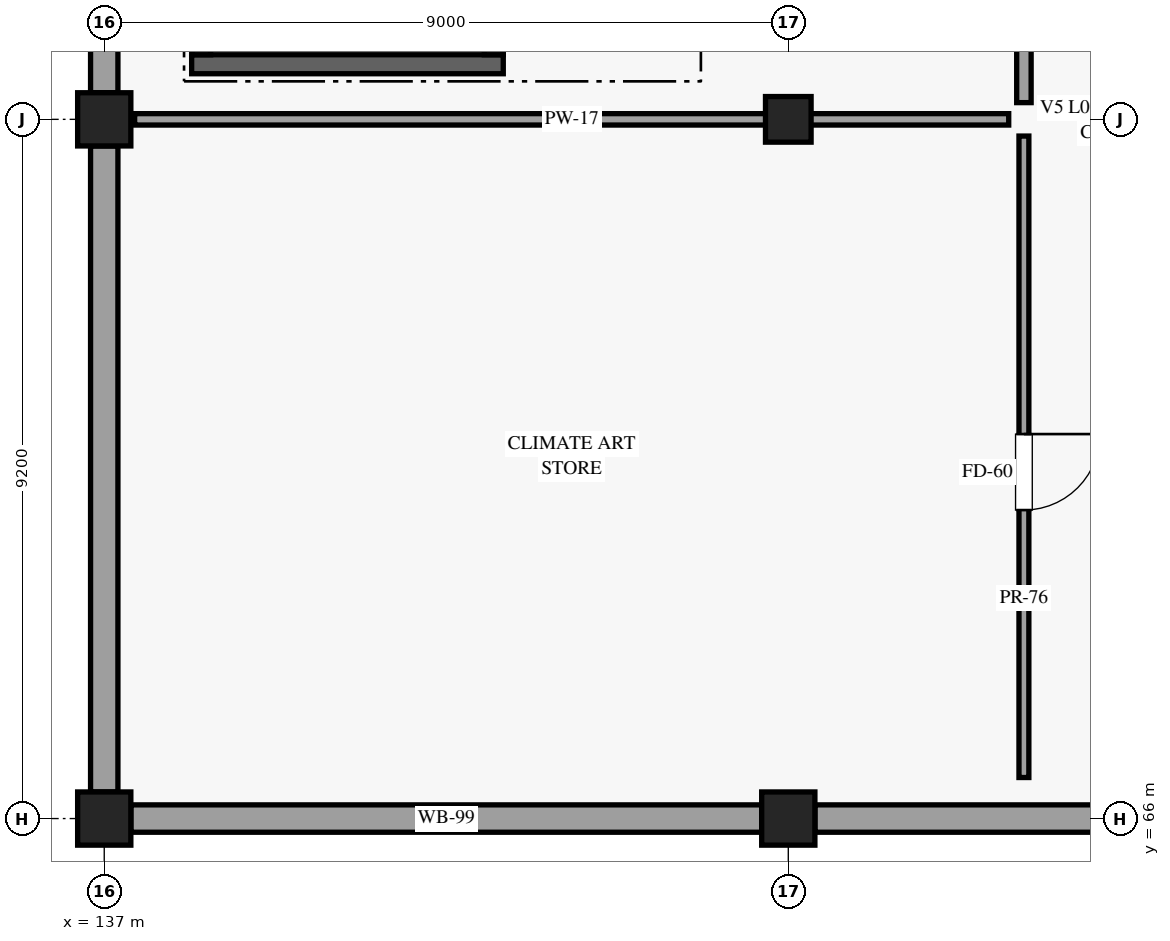
"""IFC4 building model, lengths in metres.
Left out: names, types, materials, properties, quantities, classifications, styles, units other than length and angle.
Written with IfcOpenShell. Run it as: python <this file> out.ifc"""

import sys

from ifc_helpers import new_model, si_unit, direction, frame, frame_2d, origin, origin_2d, place, context, subcontext, project, spatial, rectangle, extrude, element, fill, save


model = new_model("IFC4")
c1 = context("Model", 3, precision=1e-05, world=origin(), true_north=direction((0.0, 1.0)))
c2 = subcontext(c1, "Body", "Model", "MODEL_VIEW")
j1 = project(units=[si_unit("LENGTHUNIT", "METRE"), si_unit("PLANEANGLEUNIT", "RADIAN")], contexts=[c1])
p1 = place(None, origin())
s1 = spatial("IfcSite", under=j1, at=p1, CompositionType="ELEMENT")
p2 = place(p1, origin())
s2 = spatial("IfcBuilding", under=s1, at=p2, CompositionType="ELEMENT")
p3 = place(p2, frame((0.0, 0.0, 10.2)))
s3 = spatial("IfcBuildingStorey", under=s2, at=p3, CompositionType="ELEMENT", Elevation=10.2)
for number, where, z_axis, x_axis in (
    (1, (137.0, 66.0, 0.0), (0.0, 0.0, 1.0), (1.0, 0.0, 0.0)),
    (2, (137.0, 75.2, 0.0), (0.0, 0.0, 1.0), (1.0, 0.0, 0.0)),
    (3, (146.0, 66.0, 0.0), (0.0, 0.0, 1.0), (1.0, 0.0, 0.0)),
):
    element("IfcColumn", number, at=place(p3, frame(where, z_axis=z_axis, x_axis=x_axis)), inside=s3, PredefinedType="COLUMN", context=c2, shape_type="SweptSolid", body=[
        extrude(rectangle(XDim=0.7, YDim=0.7, at=origin_2d()), origin(), (0.0, 0.0, 1.0), 4.8),
    ])
p4 = place(p3, frame((146.0, 75.2, 0.0), z_axis=(0.0, 0.0, 1.0), x_axis=(1.0, 0.0, 0.0)))
e4 = element("IfcColumn", 4, at=p4, inside=s3, PredefinedType="COLUMN", context=c2, shape_type="SweptSolid", body=[
    extrude(rectangle(XDim=0.6, YDim=0.6, at=origin_2d()), origin(), (0.0, 0.0, 1.0), 4.8),
])
for number, where, z_axis, x_axis in (
    (5, (137.35, 66.0, 0.0), (0.0, 0.0, 1.0), (1.0, 0.0, 0.0)),
    (6, (146.35, 66.0, 0.0), (0.0, 0.0, 1.0), (1.0, 0.0, 0.0)),
):
    element("IfcWall", number, at=place(p3, frame(where, z_axis=z_axis, x_axis=x_axis)), inside=s3, PredefinedType="STANDARD", context=c2, shape_type="SweptSolid", body=[
        extrude(rectangle(XDim=8.3, YDim=0.36, at=frame_2d((4.15, 0.0))), origin(), (0.0, 0.0, 1.0), 3.715),
    ])
for number, where, z_axis, x_axis in (
    (7, (137.0, 66.35, 0.0), (0.0, 0.0, 1.0), (0.0, 1.0, 0.0)),
    (8, (137.0, 75.55, 0.0), (0.0, 0.0, 1.0), (0.0, 1.0, 0.0)),
):
    element("IfcWall", number, at=place(p3, frame(where, z_axis=z_axis, x_axis=x_axis)), inside=s3, PredefinedType="STANDARD", context=c2, shape_type="SweptSolid", body=[
        extrude(rectangle(XDim=8.5, YDim=0.36, at=frame_2d((4.25, 0.0))), origin(), (0.0, 0.0, 1.0), 3.715),
    ])
p5 = place(p3, frame((138.15, 75.925, 0.0), z_axis=(0.0, 0.0, 1.0), x_axis=(1.0, 0.0, 0.0)))
e9 = element("IfcWall", 9, at=p5, inside=s3, PredefinedType="SHEAR", context=c2, shape_type="SweptSolid", body=[
    extrude(rectangle(XDim=4.1, YDim=0.25, at=frame_2d((2.05, 0.0))), origin(), (0.0, 0.0, 1.0), 4.52),
])
for number, where, z_axis, x_axis in (
    (10, (138.275, 76.05, 0.0), (0.0, 0.0, 1.0), (0.0, 1.0, 0.0)),
    (11, (142.125, 76.05, 0.0), (0.0, 0.0, 1.0), (0.0, 1.0, 0.0)),
):
    element("IfcWall", number, at=place(p3, frame(where, z_axis=z_axis, x_axis=x_axis)), inside=s3, PredefinedType="SHEAR", context=c2, shape_type="SweptSolid", body=[
        extrude(rectangle(XDim=8.65, YDim=0.25, at=frame_2d((4.325, 0.0))), origin(), (0.0, 0.0, 1.0), 4.52),
    ])
p6 = place(p3, frame((149.1, 66.54, 0.0), z_axis=(0.0, 0.0, 1.0), x_axis=(0.0, 1.0, 0.0)))
e12 = element("IfcWall", 12, at=p6, inside=s3, PredefinedType="PARTITIONING", context=c2, shape_type="SweptSolid", body=[
    extrude(rectangle(XDim=8.44, YDim=0.13, at=frame_2d((4.22, 0.0))), origin(), (0.0, 0.0, 1.0), 3.715),
])
p7 = place(p6, frame((4.519, 0.0, 0.0), z_axis=(0.0, 0.0, 1.0), x_axis=(-1.0, 0.0, 0.0)))
e13 = element("IfcOpeningElement", 13, at=p7, cuts=e12, PredefinedType="OPENING", context=c2, shape_type="SweptSolid", body=[
    extrude(rectangle(XDim=1.0, YDim=2.2, at=frame_2d((0.5, 1.1))), frame((0.0, 0.075, 0.0), z_axis=(0.0, -1.0, 0.0), x_axis=(1.0, 0.0, 0.0)), (0.0, 0.0, 1.0), 0.15),
])
p8 = place(p3, frame((137.4, 75.2, 0.0), z_axis=(0.0, 0.0, 1.0), x_axis=(1.0, 0.0, 0.0)))
e14 = element("IfcWall", 14, at=p8, inside=s3, PredefinedType="PARTITIONING", context=c2, shape_type="SweptSolid", body=[
    extrude(rectangle(XDim=11.5, YDim=0.15, at=frame_2d((5.75, 0.0))), origin(), (0.0, 0.0, 1.0), 3.715),
])
p9 = place(p3, frame((149.1, 75.42, 0.0), z_axis=(0.0, 0.0, 1.0), x_axis=(0.0, 1.0, 0.0)))
e15 = element("IfcWall", 15, at=p9, inside=s3, PredefinedType="PARTITIONING", context=c2, shape_type="SweptSolid", body=[
    extrude(rectangle(XDim=9.08, YDim=0.19, at=frame_2d((4.54, 0.0))), origin(), (0.0, 0.0, 1.0), 3.715),
])
p10 = place(p9, frame((5.059, 0.0, 0.0), z_axis=(0.0, 0.0, 1.0), x_axis=(-1.0, 0.0, 0.0)))
e16 = element("IfcOpeningElement", 16, at=p10, cuts=e15, PredefinedType="OPENING", context=c2, shape_type="SweptSolid", body=[
    extrude(rectangle(XDim=1.12, YDim=2.26, at=frame_2d((0.56, 1.13))), frame((0.0, 0.105, 0.0), z_axis=(0.0, -1.0, 0.0), x_axis=(1.0, 0.0, 0.0)), (0.0, 0.0, 1.0), 0.21),
])
p11 = place(p7, origin())
e17 = element("IfcDoor", 17, at=p11, inside=s3, OperationType="SINGLE_SWING_LEFT", PredefinedType="DOOR", context=c2, shape_type="SweptSolid", body=[
    extrude(rectangle(XDim=1.0, YDim=2.2, at=frame_2d((0.5, 1.1))), frame((0.0, 0.025, 0.0), z_axis=(0.0, -1.0, 0.0), x_axis=(1.0, 0.0, 0.0)), (0.0, 0.0, 1.0), 0.05),
])
fill(e13, e17)
save(model, sys.argv[1])
